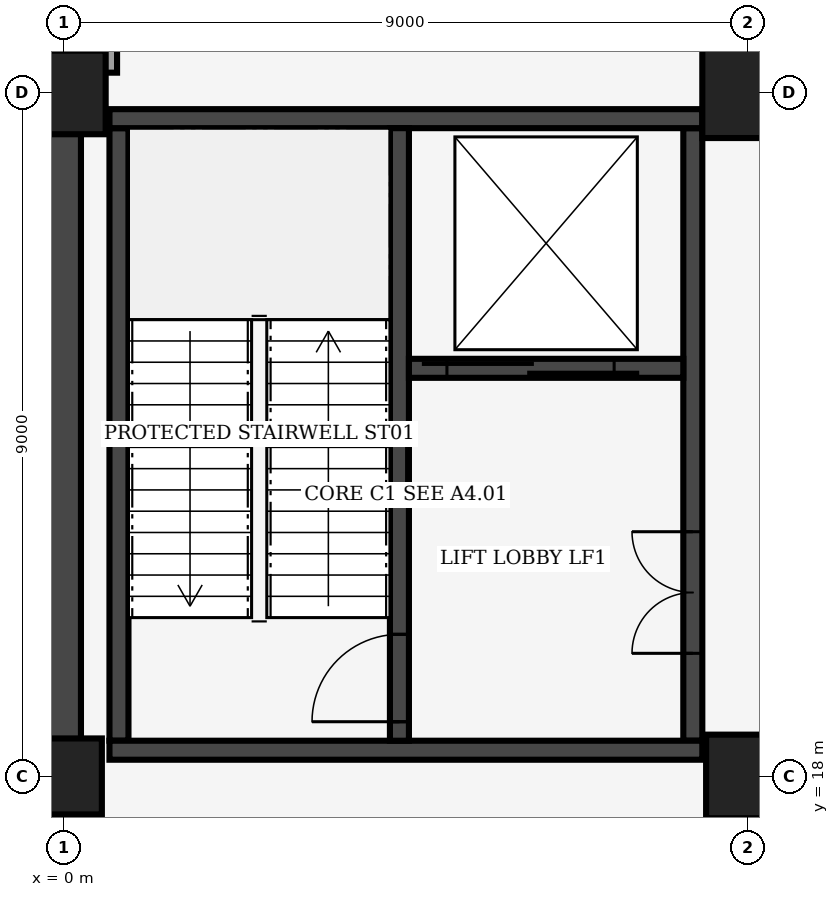
"""IFC4 building model, lengths in metres.
Left out: names, types, materials, properties, quantities, classifications, styles, units other than length and angle.
Written with IfcOpenShell. Run it as: python <this file> out.ifc"""

import sys

from ifc_helpers import new_model, si_unit, direction, frame, frame_2d, origin, origin_2d, place, context, subcontext, project, spatial, rectangle, extrude, element, fill, save


model = new_model("IFC4")
c1 = context("Model", 3, precision=1e-05, world=origin(), true_north=direction((0.0, 1.0)))
c2 = subcontext(c1, "Body", "Model", "MODEL_VIEW")
j1 = project(units=[si_unit("LENGTHUNIT", "METRE"), si_unit("PLANEANGLEUNIT", "RADIAN")], contexts=[c1])
p1 = place(None, origin())
s1 = spatial("IfcSite", under=j1, at=p1, CompositionType="ELEMENT")
p2 = place(p1, origin())
s2 = spatial("IfcBuilding", under=s1, at=p2, CompositionType="ELEMENT")
p3 = place(p2, frame((0.0, 0.0, -5.0)))
s3 = spatial("IfcBuildingStorey", under=s2, at=p3, CompositionType="ELEMENT", Elevation=-5.0)
p4 = place(p3, frame((0.0, 18.0, 0.0), z_axis=(0.0, 0.0, 1.0), x_axis=(1.0, 0.0, 0.0)))
e1 = element("IfcColumn", 1, at=p4, inside=s3, PredefinedType="COLUMN", context=c2, shape_type="SweptSolid", body=[
    extrude(rectangle(XDim=1.0, YDim=1.0, at=origin_2d()), origin(), (0.0, 0.0, 1.0), 5.0),
])
for number, where, z_axis, x_axis in (
    (2, (0.0, 27.0, 0.0), (0.0, 0.0, 1.0), (1.0, 0.0, 0.0)),
    (3, (9.0, 18.0, 0.0), (0.0, 0.0, 1.0), (1.0, 0.0, 0.0)),
):
    element("IfcColumn", number, at=place(p3, frame(where, z_axis=z_axis, x_axis=x_axis)), inside=s3, PredefinedType="COLUMN", context=c2, shape_type="SweptSolid", body=[
        extrude(rectangle(XDim=1.1, YDim=1.1, at=origin_2d()), origin(), (0.0, 0.0, 1.0), 5.0),
    ])
p5 = place(p3, frame((9.0, 27.0, 0.0), z_axis=(0.0, 0.0, 1.0), x_axis=(1.0, 0.0, 0.0)))
e4 = element("IfcColumn", 4, at=p5, inside=s3, PredefinedType="COLUMN", context=c2, shape_type="SweptSolid", body=[
    extrude(rectangle(XDim=1.2, YDim=1.2, at=origin_2d()), origin(), (0.0, 0.0, 1.0), 5.0),
])
p6 = place(p3, frame((0.0, 0.595, 0.0), z_axis=(0.0, 0.0, 1.0), x_axis=(0.0, 1.0, 0.0)))
e5 = element("IfcWall", 5, at=p6, inside=s3, PredefinedType="SHEAR", context=c2, shape_type="SweptSolid", body=[
    extrude(rectangle(XDim=52.91, YDim=0.45, at=frame_2d((26.455, 0.0))), origin(), (0.0, 0.0, 1.0), 3.95),
])
p7 = place(p3, frame((0.725, 18.47, 0.0), z_axis=(0.0, 0.0, 1.0), x_axis=(0.0, 1.0, 0.0)))
e6 = element("IfcWall", 6, at=p7, inside=s3, PredefinedType="SHEAR", context=c2, shape_type="SweptSolid", body=[
    extrude(rectangle(XDim=8.06, YDim=0.25, at=frame_2d((4.03, 0.0))), origin(), (0.0, 0.0, 1.0), 4.66),
])
p8 = place(p3, frame((8.275, 18.47, 0.0), z_axis=(0.0, 0.0, 1.0), x_axis=(0.0, 1.0, 0.0)))
e7 = element("IfcWall", 7, at=p8, inside=s3, PredefinedType="SHEAR", context=c2, shape_type="SweptSolid", body=[
    extrude(rectangle(XDim=8.06, YDim=0.25, at=frame_2d((4.03, 0.0))), origin(), (0.0, 0.0, 1.0), 4.66),
])
p9 = place(p8, frame((1.15, 0.0, 0.0)))
e8 = element("IfcOpeningElement", 8, at=p9, cuts=e7, PredefinedType="OPENING", context=c2, shape_type="SweptSolid", body=[
    extrude(rectangle(XDim=1.6, YDim=2.2, at=frame_2d((0.8, 1.1))), frame((0.0, 0.135, 0.0), z_axis=(0.0, -1.0, 0.0), x_axis=(1.0, 0.0, 0.0)), (0.0, 0.0, 1.0), 0.27),
])
for number, where, z_axis, x_axis in (
    (9, (0.6, 18.345, 0.0), (0.0, 0.0, 1.0), (1.0, 0.0, 0.0)),
    (10, (0.6, 26.655, 0.0), (0.0, 0.0, 1.0), (1.0, 0.0, 0.0)),
):
    element("IfcWall", number, at=place(p3, frame(where, z_axis=z_axis, x_axis=x_axis)), inside=s3, PredefinedType="SHEAR", context=c2, shape_type="SweptSolid", body=[
        extrude(rectangle(XDim=7.8, YDim=0.25, at=frame_2d((3.9, 0.0))), origin(), (0.0, 0.0, 1.0), 4.66),
    ])
p10 = place(p3, frame((4.415, 18.47, 0.0), z_axis=(0.0, 0.0, 1.0), x_axis=(0.0, 1.0, 0.0)))
e11 = element("IfcWall", 11, at=p10, inside=s3, PredefinedType="SHEAR", context=c2, shape_type="SweptSolid", body=[
    extrude(rectangle(XDim=8.06, YDim=0.25, at=frame_2d((4.03, 0.0))), origin(), (0.0, 0.0, 1.0), 4.66),
])
p11 = place(p10, frame((0.25, 0.0, 0.0)))
e12 = element("IfcOpeningElement", 12, at=p11, cuts=e11, PredefinedType="OPENING", context=c2, shape_type="SweptSolid", body=[
    extrude(rectangle(XDim=1.15, YDim=2.15, at=frame_2d((0.575, 1.075))), frame((0.0, 0.135, 0.0), z_axis=(0.0, -1.0, 0.0), x_axis=(1.0, 0.0, 0.0)), (0.0, 0.0, 1.0), 0.27),
])
p12 = place(p3, frame((4.54, 23.37, 0.0), z_axis=(0.0, 0.0, 1.0), x_axis=(1.0, 0.0, 0.0)))
e13 = element("IfcWall", 13, at=p12, inside=s3, PredefinedType="SHEAR", context=c2, shape_type="SweptSolid", body=[
    extrude(rectangle(XDim=3.61, YDim=0.25, at=frame_2d((1.805, 0.0))), origin(), (0.0, 0.0, 1.0), 4.66),
])
p13 = place(p12, frame((0.5, 0.0, 0.0)))
e14 = element("IfcOpeningElement", 14, at=p13, cuts=e13, PredefinedType="OPENING", context=c2, shape_type="SweptSolid", body=[
    extrude(rectangle(XDim=2.2, YDim=2.4, at=frame_2d((1.1, 1.2))), frame((0.0, 0.135, 0.0), z_axis=(0.0, -1.0, 0.0), x_axis=(1.0, 0.0, 0.0)), (0.0, 0.0, 1.0), 0.27),
])
p14 = place(p3, frame((8.6, 27.14, 0.0), z_axis=(0.0, 0.0, 1.0), x_axis=(0.0, 1.0, 0.0)))
e15 = element("IfcWall", 15, at=p14, inside=s3, PredefinedType="SOLIDWALL", context=c2, shape_type="SweptSolid", body=[
    extrude(rectangle(XDim=17.46, YDim=0.2, at=frame_2d((8.73, 0.0))), origin(), (0.0, 0.0, 1.0), 3.85),
])
p15 = place(p14, frame((1.15, 0.0, 0.0)))
e16 = element("IfcOpeningElement", 16, at=p15, cuts=e15, PredefinedType="OPENING", context=c2, shape_type="SweptSolid", body=[
    extrude(rectangle(XDim=1.05, YDim=2.15, at=frame_2d((0.525, 1.075))), frame((0.0, 0.11, 0.0), z_axis=(0.0, -1.0, 0.0), x_axis=(1.0, 0.0, 0.0)), (0.0, 0.0, 1.0), 0.22),
])
p16 = place(p3, frame((0.6, 27.26, 0.0), z_axis=(0.0, 0.0, 1.0), x_axis=(0.0, 1.0, 0.0)))
e17 = element("IfcWall", 17, at=p16, inside=s3, PredefinedType="SOLIDWALL", context=c2, shape_type="SweptSolid", body=[
    extrude(rectangle(XDim=17.22, YDim=0.2, at=frame_2d((8.61, 0.0))), origin(), (0.0, 0.0, 1.0), 3.85),
])
p17 = place(p11, origin())
e18 = element("IfcDoor", 18, at=p17, inside=s3, OperationType="SINGLE_SWING_LEFT", PredefinedType="DOOR", context=c2, shape_type="SweptSolid", body=[
    extrude(rectangle(XDim=1.15, YDim=2.15, at=frame_2d((0.575, 1.075))), frame((0.0, 0.025, 0.0), z_axis=(0.0, -1.0, 0.0), x_axis=(1.0, 0.0, 0.0)), (0.0, 0.0, 1.0), 0.05),
])
fill(e12, e18)
p18 = place(p13, origin())
e19 = element("IfcDoor", 19, at=p18, inside=s3, OperationType="DOUBLE_DOOR_SLIDING", PredefinedType="DOOR", context=c2, shape_type="SweptSolid", body=[
    extrude(rectangle(XDim=2.2, YDim=2.4, at=frame_2d((1.1, 1.2))), frame((0.0, 0.025, 0.0), z_axis=(0.0, -1.0, 0.0), x_axis=(1.0, 0.0, 0.0)), (0.0, 0.0, 1.0), 0.05),
])
fill(e14, e19)
p19 = place(p9, origin())
e20 = element("IfcDoor", 20, at=p19, inside=s3, OperationType="DOUBLE_DOOR_SINGLE_SWING", PredefinedType="DOOR", context=c2, shape_type="SweptSolid", body=[
    extrude(rectangle(XDim=1.6, YDim=2.2, at=frame_2d((0.8, 1.1))), frame((0.0, 0.025, 0.0), z_axis=(0.0, -1.0, 0.0), x_axis=(1.0, 0.0, 0.0)), (0.0, 0.0, 1.0), 0.05),
])
fill(e8, e20)
save(model, sys.argv[1])
